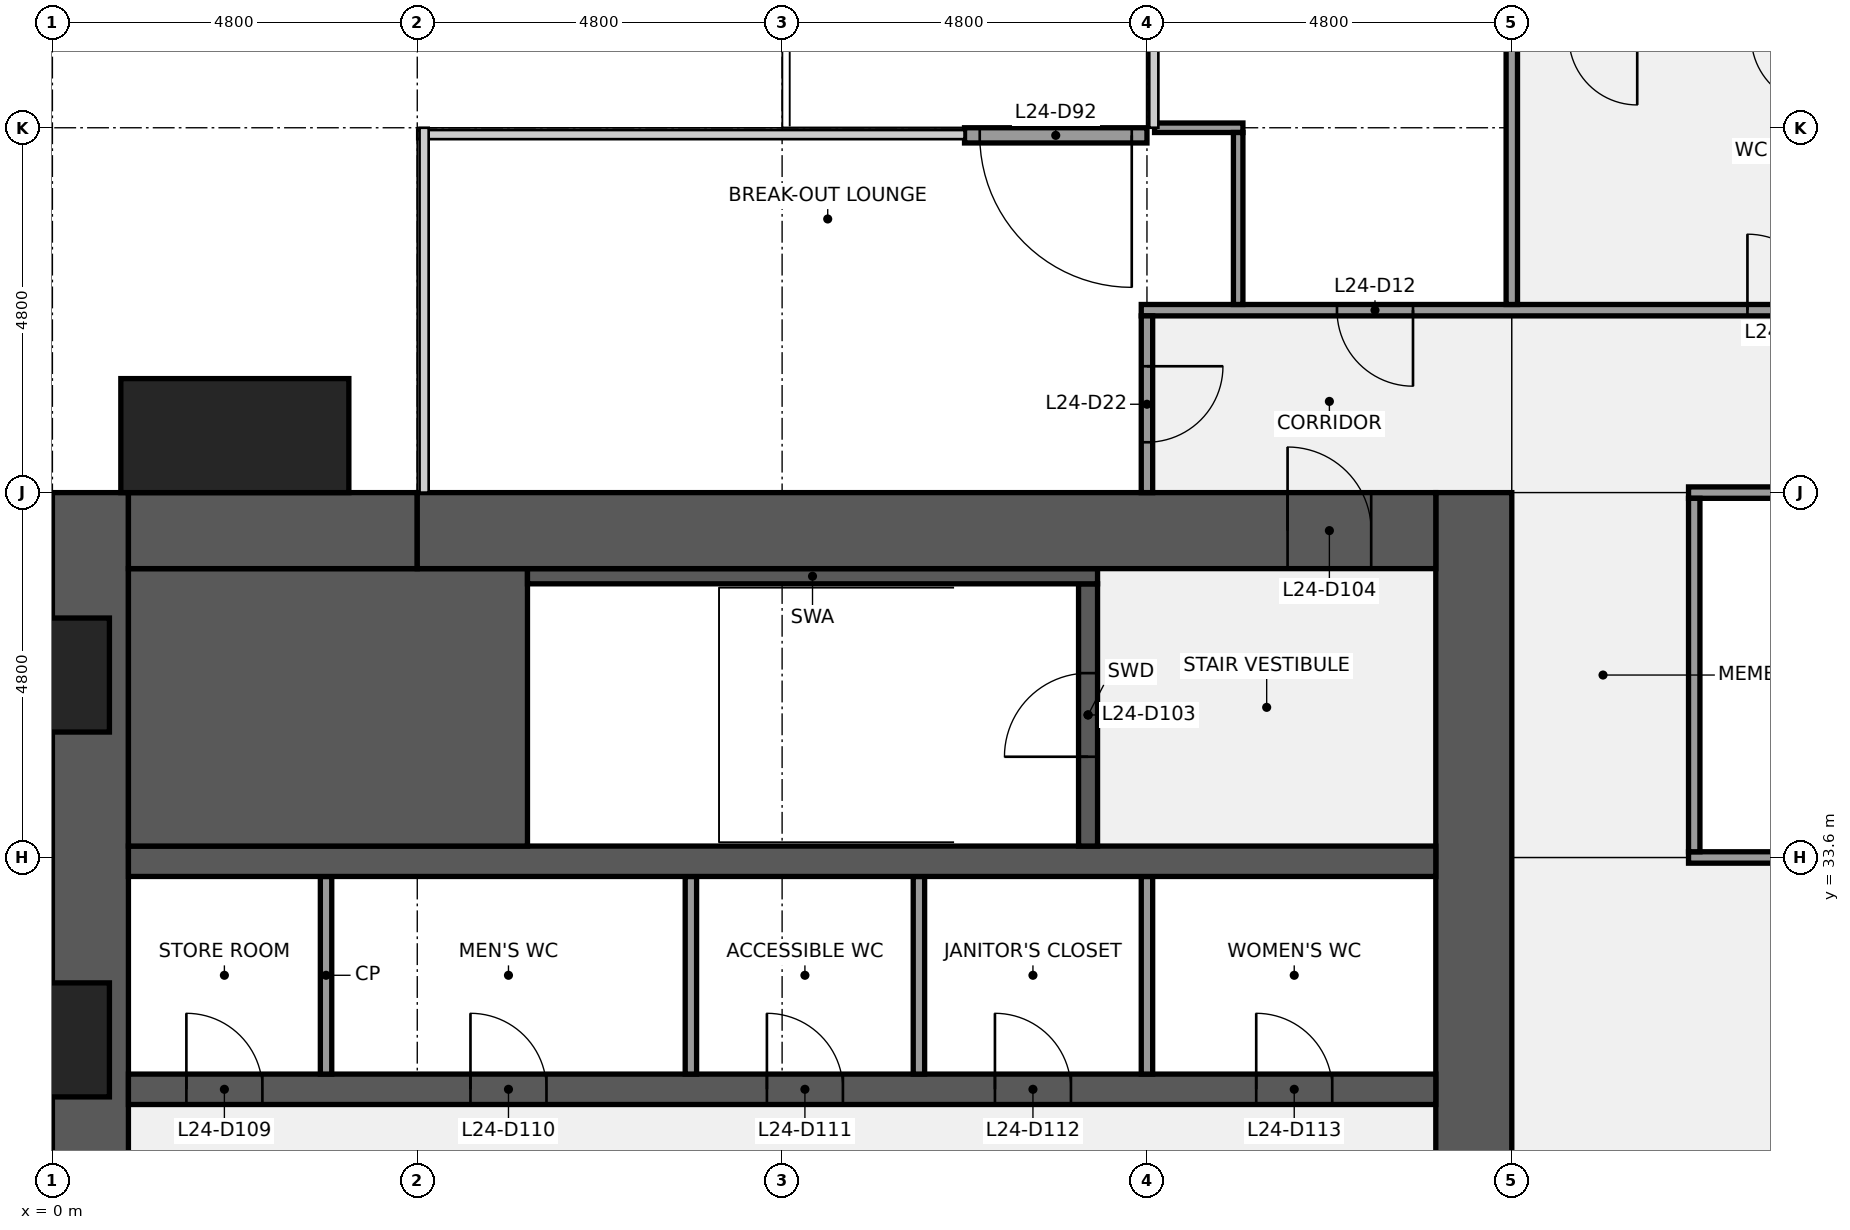
"""IFC4 building model, lengths in metres.
Left out: names, types, materials, properties, quantities, classifications, styles, units other than length and angle.
Written with IfcOpenShell. Run it as: python <this file> out.ifc"""

import sys

from ifc_helpers import new_model, si_unit, direction, frame, frame_2d, origin, origin_2d, place, context, subcontext, project, spatial, rectangle, extrude, element, fill, save


model = new_model("IFC4")
c1 = context("Model", 3, precision=1e-05, world=origin(), true_north=direction((0.0, 1.0)))
c2 = subcontext(c1, "Body", "Model", "MODEL_VIEW")
j1 = project(units=[si_unit("LENGTHUNIT", "METRE"), si_unit("PLANEANGLEUNIT", "RADIAN")], contexts=[c1])
p1 = place(None, origin())
s1 = spatial("IfcSite", under=j1, at=p1, CompositionType="ELEMENT")
p2 = place(p1, origin())
s2 = spatial("IfcBuilding", under=s1, at=p2, CompositionType="ELEMENT")
p3 = place(p2, frame((0.0, 0.0, 116.1)))
s3 = spatial("IfcBuildingStorey", under=s2, at=p3, CompositionType="ELEMENT", Elevation=116.1)
p4 = place(p3, frame((0.5, 9.6, 0.0), z_axis=(0.0, 0.0, 1.0), x_axis=(0.0, 1.0, 0.0)))
e1 = element("IfcWall", 1, at=p4, inside=s3, PredefinedType="SHEAR", context=c2, shape_type="SweptSolid", body=[
    extrude(rectangle(XDim=28.8, YDim=1.0, at=frame_2d((14.4, 0.0))), origin(), (0.0, 0.0, 1.0), 3.84),
])
p5 = place(p4, frame((8.85, 0.0, 0.9)))
e2 = element("IfcOpeningElement", 2, at=p5, cuts=e1, PredefinedType="OPENING", context=c2, shape_type="SweptSolid", body=[
    extrude(rectangle(XDim=1.5, YDim=1.5, at=frame_2d((0.75, 0.75))), frame((0.0, 0.51, 0.0), z_axis=(0.0, -1.0, 0.0), x_axis=(1.0, 0.0, 0.0)), (0.0, 0.0, 1.0), 1.02),
])
p6 = place(p4, frame((18.45, 0.0, 0.9)))
e3 = element("IfcOpeningElement", 3, at=p6, cuts=e1, PredefinedType="OPENING", context=c2, shape_type="SweptSolid", body=[
    extrude(rectangle(XDim=1.5, YDim=1.5, at=frame_2d((0.75, 0.75))), frame((0.0, 0.51, 0.0), z_axis=(0.0, -1.0, 0.0), x_axis=(1.0, 0.0, 0.0)), (0.0, 0.0, 1.0), 1.02),
])
p7 = place(p3, frame((18.7, 38.4, 0.0), z_axis=(0.0, 0.0, 1.0), x_axis=(0.0, -1.0, 0.0)))
e4 = element("IfcWall", 4, at=p7, inside=s3, PredefinedType="SHEAR", context=c2, shape_type="SweptSolid", body=[
    extrude(rectangle(XDim=28.8, YDim=1.0, at=frame_2d((14.4, 0.0))), origin(), (0.0, 0.0, 1.0), 3.84),
])
p8 = place(p7, frame((18.3, 0.0, 0.0)))
e5 = element("IfcOpeningElement", 5, at=p8, cuts=e4, PredefinedType="OPENING", context=c2, shape_type="SweptSolid", body=[
    extrude(rectangle(XDim=1.8, YDim=2.1, at=frame_2d((0.9, 1.05))), frame((0.0, 0.51, 0.0), z_axis=(0.0, -1.0, 0.0), x_axis=(1.0, 0.0, 0.0)), (0.0, 0.0, 1.0), 1.02),
])
p9 = place(p7, frame((8.7, 0.0, 0.0)))
e6 = element("IfcOpeningElement", 6, at=p9, cuts=e4, PredefinedType="OPENING", context=c2, shape_type="SweptSolid", body=[
    extrude(rectangle(XDim=1.8, YDim=2.1, at=frame_2d((0.9, 1.05))), frame((0.0, 0.51, 0.0), z_axis=(0.0, -1.0, 0.0), x_axis=(1.0, 0.0, 0.0)), (0.0, 0.0, 1.0), 1.02),
])
p10 = place(p3, frame((1.0, 30.55, 0.0), z_axis=(0.0, 0.0, 1.0), x_axis=(1.0, 0.0, 0.0)))
e7 = element("IfcWall", 7, at=p10, inside=s3, PredefinedType="SHEAR", context=c2, shape_type="SweptSolid", body=[
    extrude(rectangle(XDim=17.2, YDim=0.4, at=frame_2d((8.6, 0.0))), origin(), (0.0, 0.0, 1.0), 3.84),
])
p11 = place(p10, frame((0.762, 0.0, 0.0)))
e8 = element("IfcOpeningElement", 8, at=p11, cuts=e7, PredefinedType="OPENING", context=c2, shape_type="SweptSolid", body=[
    extrude(rectangle(XDim=1.0, YDim=2.1, at=frame_2d((0.5, 1.05))), frame((0.0, 0.21, 0.0), z_axis=(0.0, -1.0, 0.0), x_axis=(1.0, 0.0, 0.0)), (0.0, 0.0, 1.0), 0.42),
])
p12 = place(p10, frame((4.5, 0.0, 0.0)))
e9 = element("IfcOpeningElement", 9, at=p12, cuts=e7, PredefinedType="OPENING", context=c2, shape_type="SweptSolid", body=[
    extrude(rectangle(XDim=1.0, YDim=2.1, at=frame_2d((0.5, 1.05))), frame((0.0, 0.21, 0.0), z_axis=(0.0, -1.0, 0.0), x_axis=(1.0, 0.0, 0.0)), (0.0, 0.0, 1.0), 0.42),
])
p13 = place(p10, frame((8.4, 0.0, 0.0)))
e10 = element("IfcOpeningElement", 10, at=p13, cuts=e7, PredefinedType="OPENING", context=c2, shape_type="SweptSolid", body=[
    extrude(rectangle(XDim=1.0, YDim=2.1, at=frame_2d((0.5, 1.05))), frame((0.0, 0.21, 0.0), z_axis=(0.0, -1.0, 0.0), x_axis=(1.0, 0.0, 0.0)), (0.0, 0.0, 1.0), 0.42),
])
p14 = place(p10, frame((11.4, 0.0, 0.0)))
e11 = element("IfcOpeningElement", 11, at=p14, cuts=e7, PredefinedType="OPENING", context=c2, shape_type="SweptSolid", body=[
    extrude(rectangle(XDim=1.0, YDim=2.1, at=frame_2d((0.5, 1.05))), frame((0.0, 0.21, 0.0), z_axis=(0.0, -1.0, 0.0), x_axis=(1.0, 0.0, 0.0)), (0.0, 0.0, 1.0), 0.42),
])
p15 = place(p10, frame((14.837, 0.0, 0.0)))
e12 = element("IfcOpeningElement", 12, at=p15, cuts=e7, PredefinedType="OPENING", context=c2, shape_type="SweptSolid", body=[
    extrude(rectangle(XDim=1.0, YDim=2.1, at=frame_2d((0.5, 1.05))), frame((0.0, 0.21, 0.0), z_axis=(0.0, -1.0, 0.0), x_axis=(1.0, 0.0, 0.0)), (0.0, 0.0, 1.0), 0.42),
])
for number, where, z_axis, x_axis in (
    (13, (3.6, 30.75, 0.0), (0.0, 0.0, 1.0), (0.0, 1.0, 0.0)),
    (14, (8.4, 30.75, 0.0), (0.0, 0.0, 1.0), (0.0, 1.0, 0.0)),
    (15, (11.4, 30.75, 0.0), (0.0, 0.0, 1.0), (0.0, 1.0, 0.0)),
    (16, (14.4, 30.75, 0.0), (0.0, 0.0, 1.0), (0.0, 1.0, 0.0)),
):
    element("IfcWall", number, at=place(p3, frame(where, z_axis=z_axis, x_axis=x_axis)), inside=s3, PredefinedType="PARTITIONING", context=c2, shape_type="SweptSolid", body=[
        extrude(rectangle(XDim=2.6, YDim=0.15, at=frame_2d((1.3, 0.0))), origin(), (0.0, 0.0, 1.0), 3.84),
    ])
p16 = place(p3, frame((1.0, 33.55, 0.0), z_axis=(0.0, 0.0, 1.0), x_axis=(1.0, 0.0, 0.0)))
e17 = element("IfcWall", 17, at=p16, inside=s3, PredefinedType="SHEAR", context=c2, shape_type="SweptSolid", body=[
    extrude(rectangle(XDim=17.2, YDim=0.4, at=frame_2d((8.6, 0.0))), origin(), (0.0, 0.0, 1.0), 3.84),
])
p17 = place(p3, frame((1.0, 35.575, 0.0), z_axis=(0.0, 0.0, 1.0), x_axis=(1.0, 0.0, 0.0)))
e18 = element("IfcWall", 18, at=p17, inside=s3, PredefinedType="SHEAR", context=c2, shape_type="SweptSolid", body=[
    extrude(rectangle(XDim=5.25, YDim=3.65, at=frame_2d((2.625, 0.0))), origin(), (0.0, 0.0, 1.0), 3.84),
])
p18 = place(p3, frame((13.625, 33.75, 0.0), z_axis=(0.0, 0.0, 1.0), x_axis=(0.0, 1.0, 0.0)))
e19 = element("IfcWall", 19, at=p18, inside=s3, PredefinedType="SHEAR", context=c2, shape_type="SweptSolid", body=[
    extrude(rectangle(XDim=3.45, YDim=0.25, at=frame_2d((1.725, 0.0))), origin(), (0.0, 0.0, 1.0), 3.84),
])
p19 = place(p18, frame((1.175, 0.0, 0.0)))
e20 = element("IfcOpeningElement", 20, at=p19, cuts=e19, PredefinedType="OPENING", context=c2, shape_type="SweptSolid", body=[
    extrude(rectangle(XDim=1.1, YDim=2.1, at=frame_2d((0.55, 1.05))), frame((0.0, 0.135, 0.0), z_axis=(0.0, -1.0, 0.0), x_axis=(1.0, 0.0, 0.0)), (0.0, 0.0, 1.0), 0.27),
])
p20 = place(p3, frame((6.25, 37.3, 0.0), z_axis=(0.0, 0.0, 1.0), x_axis=(1.0, 0.0, 0.0)))
e21 = element("IfcWall", 21, at=p20, inside=s3, PredefinedType="SHEAR", context=c2, shape_type="SweptSolid", body=[
    extrude(rectangle(XDim=7.5, YDim=0.2, at=frame_2d((3.75, 0.0))), origin(), (0.0, 0.0, 1.0), 3.84),
])
p21 = place(p3, frame((1.0, 37.9, 0.0), z_axis=(0.0, 0.0, 1.0), x_axis=(1.0, 0.0, 0.0)))
e22 = element("IfcWall", 22, at=p21, inside=s3, PredefinedType="SHEAR", context=c2, shape_type="SweptSolid", body=[
    extrude(rectangle(XDim=3.8, YDim=1.0, at=frame_2d((1.9, 0.0))), origin(), (0.0, 0.0, 1.0), 3.84),
])
p22 = place(p3, frame((4.8, 37.9, 0.0), z_axis=(0.0, 0.0, 1.0), x_axis=(1.0, 0.0, 0.0)))
e23 = element("IfcWall", 23, at=p22, inside=s3, PredefinedType="SHEAR", context=c2, shape_type="SweptSolid", body=[
    extrude(rectangle(XDim=13.4, YDim=1.0, at=frame_2d((6.7, 0.0))), origin(), (0.0, 0.0, 1.0), 3.84),
])
p23 = place(p22, frame((11.45, 0.0, 0.0)))
e24 = element("IfcOpeningElement", 24, at=p23, cuts=e23, PredefinedType="OPENING", context=c2, shape_type="SweptSolid", body=[
    extrude(rectangle(XDim=1.1, YDim=2.1, at=frame_2d((0.55, 1.05))), frame((0.0, 0.51, 0.0), z_axis=(0.0, -1.0, 0.0), x_axis=(1.0, 0.0, 0.0)), (0.0, 0.0, 1.0), 1.02),
])
p24 = place(p3, frame((21.525, 33.6, 0.0), z_axis=(0.0, 0.0, 1.0), x_axis=(1.0, 0.0, 0.0)))
e25 = element("IfcWall", 25, at=p24, inside=s3, PredefinedType="PARTITIONING", context=c2, shape_type="SweptSolid", body=[
    extrude(rectangle(XDim=2.55, YDim=0.15, at=frame_2d((1.275, 0.0))), origin(), (0.0, 0.0, 1.0), 2.936),
])
p25 = place(p3, frame((21.525, 38.4, 0.0), z_axis=(0.0, 0.0, 1.0), x_axis=(1.0, 0.0, 0.0)))
e26 = element("IfcWall", 26, at=p25, inside=s3, PredefinedType="PARTITIONING", context=c2, shape_type="SweptSolid", body=[
    extrude(rectangle(XDim=14.55, YDim=0.15, at=frame_2d((7.275, 0.0))), origin(), (0.0, 0.0, 1.0), 2.936),
])
p26 = place(p25, frame((3.175, 0.0, 0.0)))
e27 = element("IfcOpeningElement", 27, at=p26, cuts=e26, PredefinedType="OPENING", context=c2, shape_type="SweptSolid", body=[
    extrude(rectangle(XDim=1.0, YDim=2.1, at=frame_2d((0.5, 1.05))), frame((0.0, 0.085, 0.0), z_axis=(0.0, -1.0, 0.0), x_axis=(1.0, 0.0, 0.0)), (0.0, 0.0, 1.0), 0.17),
])
p27 = place(p25, frame((10.375, 0.0, 0.0)))
e28 = element("IfcOpeningElement", 28, at=p27, cuts=e26, PredefinedType="OPENING", context=c2, shape_type="SweptSolid", body=[
    extrude(rectangle(XDim=1.0, YDim=2.1, at=frame_2d((0.5, 1.05))), frame((0.0, 0.085, 0.0), z_axis=(0.0, -1.0, 0.0), x_axis=(1.0, 0.0, 0.0)), (0.0, 0.0, 1.0), 0.17),
])
p28 = place(p3, frame((14.325, 40.8, 0.0), z_axis=(0.0, 0.0, 1.0), x_axis=(1.0, 0.0, 0.0)))
e29 = element("IfcWall", 29, at=p28, inside=s3, PredefinedType="PARTITIONING", context=c2, shape_type="SweptSolid", body=[
    extrude(rectangle(XDim=28.95, YDim=0.15, at=frame_2d((14.475, 0.0))), origin(), (0.0, 0.0, 1.0), 2.936),
])
p29 = place(p28, frame((2.575, 0.0, 0.0)))
e30 = element("IfcOpeningElement", 30, at=p29, cuts=e29, PredefinedType="OPENING", context=c2, shape_type="SweptSolid", body=[
    extrude(rectangle(XDim=1.0, YDim=2.1, at=frame_2d((0.5, 1.05))), frame((0.0, 0.085, 0.0), z_axis=(0.0, -1.0, 0.0), x_axis=(1.0, 0.0, 0.0)), (0.0, 0.0, 1.0), 0.17),
])
p30 = place(p28, frame((7.975, 0.0, 0.0)))
e31 = element("IfcOpeningElement", 31, at=p30, cuts=e29, PredefinedType="OPENING", context=c2, shape_type="SweptSolid", body=[
    extrude(rectangle(XDim=1.0, YDim=2.1, at=frame_2d((0.5, 1.05))), frame((0.0, 0.085, 0.0), z_axis=(0.0, -1.0, 0.0), x_axis=(1.0, 0.0, 0.0)), (0.0, 0.0, 1.0), 0.17),
])
p31 = place(p28, frame((13.975, 0.0, 0.0)))
e32 = element("IfcOpeningElement", 32, at=p31, cuts=e29, PredefinedType="OPENING", context=c2, shape_type="SweptSolid", body=[
    extrude(rectangle(XDim=1.0, YDim=2.1, at=frame_2d((0.5, 1.05))), frame((0.0, 0.085, 0.0), z_axis=(0.0, -1.0, 0.0), x_axis=(1.0, 0.0, 0.0)), (0.0, 0.0, 1.0), 0.17),
])
p32 = place(p28, frame((18.775, 0.0, 0.0)))
e33 = element("IfcOpeningElement", 33, at=p32, cuts=e29, PredefinedType="OPENING", context=c2, shape_type="SweptSolid", body=[
    extrude(rectangle(XDim=1.0, YDim=2.1, at=frame_2d((0.5, 1.05))), frame((0.0, 0.085, 0.0), z_axis=(0.0, -1.0, 0.0), x_axis=(1.0, 0.0, 0.0)), (0.0, 0.0, 1.0), 0.17),
])
p33 = place(p28, frame((22.375, 0.0, 0.0)))
e34 = element("IfcOpeningElement", 34, at=p33, cuts=e29, PredefinedType="OPENING", context=c2, shape_type="SweptSolid", body=[
    extrude(rectangle(XDim=1.0, YDim=2.1, at=frame_2d((0.5, 1.05))), frame((0.0, 0.085, 0.0), z_axis=(0.0, -1.0, 0.0), x_axis=(1.0, 0.0, 0.0)), (0.0, 0.0, 1.0), 0.17),
])
p34 = place(p28, frame((25.975, 0.0, 0.0)))
e35 = element("IfcOpeningElement", 35, at=p34, cuts=e29, PredefinedType="OPENING", context=c2, shape_type="SweptSolid", body=[
    extrude(rectangle(XDim=1.0, YDim=2.1, at=frame_2d((0.5, 1.05))), frame((0.0, 0.085, 0.0), z_axis=(0.0, -1.0, 0.0), x_axis=(1.0, 0.0, 0.0)), (0.0, 0.0, 1.0), 0.17),
])
p35 = place(p3, frame((14.5, 43.2, 0.0), z_axis=(0.0, 0.0, 1.0), x_axis=(1.0, 0.0, 0.0)))
e36 = element("IfcWall", 36, at=p35, inside=s3, PredefinedType="PARTITIONING", context=c2, shape_type="SweptSolid", body=[
    extrude(rectangle(XDim=1.163, YDim=0.125, at=frame_2d((0.581, 0.0))), origin(), (0.0, 0.0, 1.0), 2.936),
])
p36 = place(p3, frame((14.4, 38.4, 0.0), z_axis=(0.0, 0.0, 1.0), x_axis=(0.0, 1.0, 0.0)))
e37 = element("IfcWall", 37, at=p36, inside=s3, PredefinedType="PARTITIONING", context=c2, shape_type="SweptSolid", body=[
    extrude(rectangle(XDim=2.325, YDim=0.15, at=frame_2d((1.163, 0.0))), origin(), (0.0, 0.0, 1.0), 2.936),
])
p37 = place(p36, frame((0.663, 0.0, 0.0)))
e38 = element("IfcOpeningElement", 38, at=p37, cuts=e37, PredefinedType="OPENING", context=c2, shape_type="SweptSolid", body=[
    extrude(rectangle(XDim=1.0, YDim=2.1, at=frame_2d((0.5, 1.05))), frame((0.0, 0.085, 0.0), z_axis=(0.0, -1.0, 0.0), x_axis=(1.0, 0.0, 0.0)), (0.0, 0.0, 1.0), 0.17),
])
p38 = place(p3, frame((15.6, 40.875, 0.0), z_axis=(0.0, 0.0, 1.0), x_axis=(0.0, 1.0, 0.0)))
e39 = element("IfcWall", 39, at=p38, inside=s3, PredefinedType="PARTITIONING", context=c2, shape_type="SweptSolid", body=[
    extrude(rectangle(XDim=2.262, YDim=0.125, at=frame_2d((1.131, 0.0))), origin(), (0.0, 0.0, 1.0), 2.936),
])
p39 = place(p3, frame((19.2, 40.875, 0.0), z_axis=(0.0, 0.0, 1.0), x_axis=(0.0, 1.0, 0.0)))
e40 = element("IfcWall", 40, at=p39, inside=s3, PredefinedType="PARTITIONING", context=c2, shape_type="SweptSolid", body=[
    extrude(rectangle(XDim=3.45, YDim=0.15, at=frame_2d((1.725, 0.0))), origin(), (0.0, 0.0, 1.0), 2.936),
])
p40 = place(p3, frame((21.6, 33.675, 0.0), z_axis=(0.0, 0.0, 1.0), x_axis=(0.0, 1.0, 0.0)))
e41 = element("IfcWall", 41, at=p40, inside=s3, PredefinedType="PARTITIONING", context=c2, shape_type="SweptSolid", body=[
    extrude(rectangle(XDim=4.65, YDim=0.15, at=frame_2d((2.325, 0.0))), origin(), (0.0, 0.0, 1.0), 2.936),
])
p41 = place(p3, frame((14.4, 43.1, 0.0), z_axis=(0.0, 0.0, 1.0), x_axis=(-1.0, 0.0, 0.0)))
e42 = element("IfcWall", 42, at=p41, inside=s3, PredefinedType="SOLIDWALL", context=c2, shape_type="SweptSolid", body=[
    extrude(rectangle(XDim=2.4, YDim=0.2, at=frame_2d((1.2, 0.0))), origin(), (0.0, 0.0, 1.0), 3.296),
])
p42 = place(p41, frame((0.2, 0.0, 0.0)))
e43 = element("IfcOpeningElement", 43, at=p42, cuts=e42, PredefinedType="OPENING", context=c2, shape_type="SweptSolid", body=[
    extrude(rectangle(XDim=2.0, YDim=2.1, at=frame_2d((1.0, 1.05))), frame((0.0, 0.11, 0.0), z_axis=(0.0, -1.0, 0.0), x_axis=(1.0, 0.0, 0.0)), (0.0, 0.0, 1.0), 0.22),
])
p43 = place(p3, frame((2.4, 39.15, 0.0), z_axis=(0.0, 0.0, 1.0), x_axis=(1.0, 0.0, 0.0)))
e44 = element("IfcColumn", 44, at=p43, inside=s3, PredefinedType="PILASTER", context=c2, shape_type="SweptSolid", body=[
    extrude(rectangle(XDim=3.0, YDim=1.5, at=origin_2d()), origin(), (0.0, 0.0, 1.0), 4.0),
])
p44 = place(p19, origin())
e45 = element("IfcDoor", 45, at=p44, inside=s3, OperationType="SINGLE_SWING_LEFT", PredefinedType="DOOR", context=c2, shape_type="SweptSolid", body=[
    extrude(rectangle(XDim=1.1, YDim=2.1, at=frame_2d((0.55, 1.05))), frame((0.0, 0.025, 0.0), z_axis=(0.0, -1.0, 0.0), x_axis=(1.0, 0.0, 0.0)), (0.0, 0.0, 1.0), 0.05),
])
fill(e20, e45)
p45 = place(p23, origin())
e46 = element("IfcDoor", 46, at=p45, inside=s3, OperationType="SINGLE_SWING_LEFT", PredefinedType="DOOR", context=c2, shape_type="SweptSolid", body=[
    extrude(rectangle(XDim=1.1, YDim=2.1, at=frame_2d((0.55, 1.05))), frame((0.0, 0.025, 0.0), z_axis=(0.0, -1.0, 0.0), x_axis=(1.0, 0.0, 0.0)), (0.0, 0.0, 1.0), 0.05),
])
fill(e24, e46)
p46 = place(p11, origin())
e47 = element("IfcDoor", 47, at=p46, inside=s3, OperationType="SINGLE_SWING_LEFT", PredefinedType="DOOR", context=c2, shape_type="SweptSolid", body=[
    extrude(rectangle(XDim=1.0, YDim=2.1, at=frame_2d((0.5, 1.05))), frame((0.0, 0.025, 0.0), z_axis=(0.0, -1.0, 0.0), x_axis=(1.0, 0.0, 0.0)), (0.0, 0.0, 1.0), 0.05),
])
fill(e8, e47)
p47 = place(p12, origin())
e48 = element("IfcDoor", 48, at=p47, inside=s3, OperationType="SINGLE_SWING_LEFT", PredefinedType="DOOR", context=c2, shape_type="SweptSolid", body=[
    extrude(rectangle(XDim=1.0, YDim=2.1, at=frame_2d((0.5, 1.05))), frame((0.0, 0.025, 0.0), z_axis=(0.0, -1.0, 0.0), x_axis=(1.0, 0.0, 0.0)), (0.0, 0.0, 1.0), 0.05),
])
fill(e9, e48)
p48 = place(p13, origin())
e49 = element("IfcDoor", 49, at=p48, inside=s3, OperationType="SINGLE_SWING_LEFT", PredefinedType="DOOR", context=c2, shape_type="SweptSolid", body=[
    extrude(rectangle(XDim=1.0, YDim=2.1, at=frame_2d((0.5, 1.05))), frame((0.0, 0.025, 0.0), z_axis=(0.0, -1.0, 0.0), x_axis=(1.0, 0.0, 0.0)), (0.0, 0.0, 1.0), 0.05),
])
fill(e10, e49)
p49 = place(p14, origin())
e50 = element("IfcDoor", 50, at=p49, inside=s3, OperationType="SINGLE_SWING_LEFT", PredefinedType="DOOR", context=c2, shape_type="SweptSolid", body=[
    extrude(rectangle(XDim=1.0, YDim=2.1, at=frame_2d((0.5, 1.05))), frame((0.0, 0.025, 0.0), z_axis=(0.0, -1.0, 0.0), x_axis=(1.0, 0.0, 0.0)), (0.0, 0.0, 1.0), 0.05),
])
fill(e11, e50)
p50 = place(p15, origin())
e51 = element("IfcDoor", 51, at=p50, inside=s3, OperationType="SINGLE_SWING_LEFT", PredefinedType="DOOR", context=c2, shape_type="SweptSolid", body=[
    extrude(rectangle(XDim=1.0, YDim=2.1, at=frame_2d((0.5, 1.05))), frame((0.0, 0.025, 0.0), z_axis=(0.0, -1.0, 0.0), x_axis=(1.0, 0.0, 0.0)), (0.0, 0.0, 1.0), 0.05),
])
fill(e12, e51)
p51 = place(p29, origin())
e52 = element("IfcDoor", 52, at=p51, inside=s3, OperationType="SINGLE_SWING_RIGHT", PredefinedType="DOOR", context=c2, shape_type="SweptSolid", body=[
    extrude(rectangle(XDim=1.0, YDim=2.1, at=frame_2d((0.5, 1.05))), frame((0.0, 0.025, 0.0), z_axis=(0.0, -1.0, 0.0), x_axis=(1.0, 0.0, 0.0)), (0.0, 0.0, 1.0), 0.05),
])
fill(e30, e52)
p52 = place(p30, origin())
e53 = element("IfcDoor", 53, at=p52, inside=s3, OperationType="SINGLE_SWING_LEFT", PredefinedType="DOOR", context=c2, shape_type="SweptSolid", body=[
    extrude(rectangle(XDim=1.0, YDim=2.1, at=frame_2d((0.5, 1.05))), frame((0.0, 0.025, 0.0), z_axis=(0.0, -1.0, 0.0), x_axis=(1.0, 0.0, 0.0)), (0.0, 0.0, 1.0), 0.05),
])
fill(e31, e53)
p53 = place(p37, origin())
e54 = element("IfcDoor", 54, at=p53, inside=s3, OperationType="SINGLE_SWING_RIGHT", PredefinedType="DOOR", context=c2, shape_type="SweptSolid", body=[
    extrude(rectangle(XDim=1.0, YDim=2.1, at=frame_2d((0.5, 1.05))), frame((0.0, 0.025, 0.0), z_axis=(0.0, -1.0, 0.0), x_axis=(1.0, 0.0, 0.0)), (0.0, 0.0, 1.0), 0.05),
])
fill(e38, e54)
p54 = place(p42, origin())
e55 = element("IfcDoor", 55, at=p54, inside=s3, OperationType="SINGLE_SWING_LEFT", PredefinedType="DOOR", context=c2, shape_type="SweptSolid", body=[
    extrude(rectangle(XDim=2.0, YDim=2.1, at=frame_2d((1.0, 1.05))), frame((0.0, 0.025, 0.0), z_axis=(0.0, -1.0, 0.0), x_axis=(1.0, 0.0, 0.0)), (0.0, 0.0, 1.0), 0.05),
])
fill(e43, e55)
save(model, sys.argv[1])
